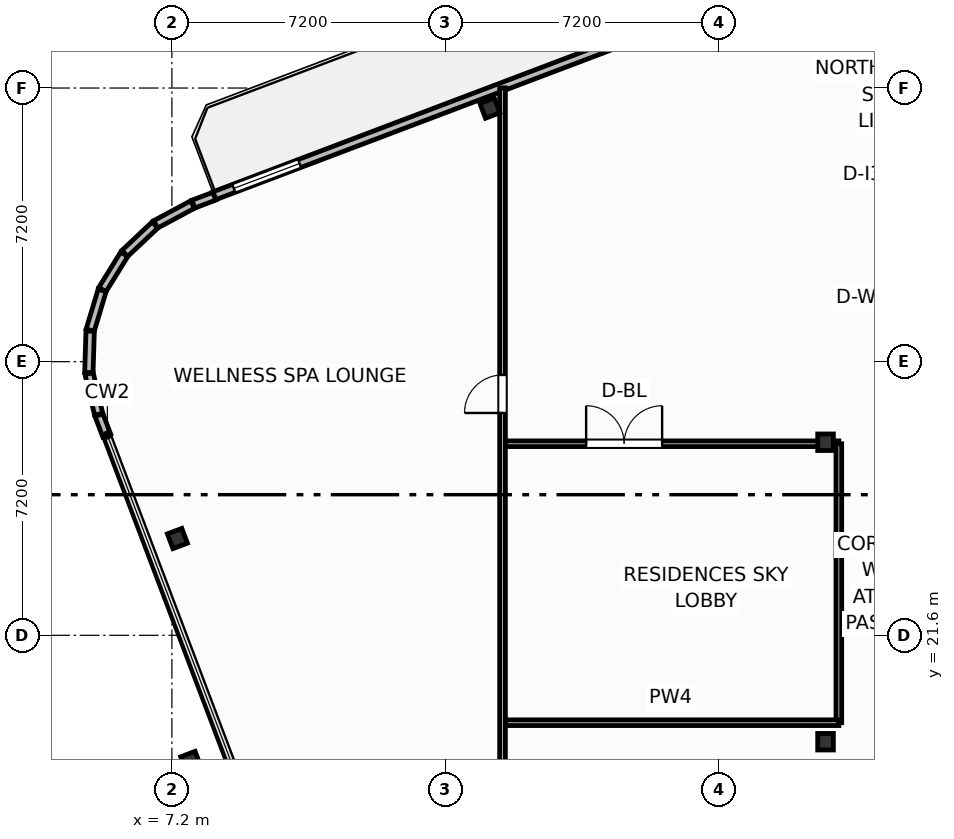
"""IFC4 building model, lengths in metres.
Left out: names, types, materials, properties, quantities, classifications, styles, units other than length and angle.
Written with IfcOpenShell. Run it as: python <this file> out.ifc"""

import sys

from ifc_helpers import new_model, si_unit, direction, frame, frame_2d, origin, origin_2d, place, context, subcontext, project, spatial, rectangle, i_section, extrude, element, fill, save


model = new_model("IFC4")
c1 = context("Model", 3, precision=1e-05, world=origin(), true_north=direction((0.0, 1.0)))
c2 = subcontext(c1, "Body", "Model", "MODEL_VIEW")
j1 = project(units=[si_unit("LENGTHUNIT", "METRE"), si_unit("PLANEANGLEUNIT", "RADIAN")], contexts=[c1])
p1 = place(None, origin())
s1 = spatial("IfcSite", under=j1, at=p1, CompositionType="ELEMENT")
p2 = place(p1, origin())
s2 = spatial("IfcBuilding", under=s1, at=p2, CompositionType="ELEMENT")
p3 = place(p2, frame((0.0, 0.0, 207.9)))
s3 = spatial("IfcBuildingStorey", under=s2, at=p3, CompositionType="ELEMENT", Elevation=207.9)
for number, where, z_axis, x_axis in (
    (1, (24.4, 18.8, 0.0), (0.0, 0.0, 1.0), (1.0, 0.0, 0.0)),
    (2, (24.4, 26.68, 0.0), (0.0, 0.0, 1.0), (1.0, 0.0, 0.0)),
):
    element("IfcColumn", number, at=place(p3, frame(where, z_axis=z_axis, x_axis=x_axis)), inside=s3, PredefinedType="COLUMN", context=c2, shape_type="SweptSolid", body=[
        extrude(i_section(OverallWidth=0.412, OverallDepth=0.435, WebThickness=0.036, FlangeThickness=0.057, FilletRadius=0.025, at=origin_2d()), origin(), (0.0, 0.0, 1.0), 4.8),
    ])
for number, where, z_axis, x_axis in (
    (3, (15.568, 35.472, -0.32), (0.0, 0.0, 1.0), (0.935, 0.354, 0.0)),
    (4, (7.345, 24.146, -0.32), (0.0, 0.0, 1.0), (0.935, 0.354, 0.0)),
    (5, (7.695, 18.281, -0.32), (0.0, 0.0, 1.0), (0.935, 0.354, 0.0)),
):
    element("IfcColumn", number, at=place(p3, frame(where, z_axis=z_axis, x_axis=x_axis)), inside=s3, PredefinedType="COLUMN", context=c2, shape_type="SweptSolid", body=[
        extrude(i_section(OverallWidth=0.406, OverallDepth=0.416, WebThickness=0.03, FlangeThickness=0.048, FilletRadius=0.025, at=origin_2d()), origin(), (0.0, 0.0, 1.0), 5.12),
    ])
p4 = place(p3, frame((8.315, 33.164, 0.0), z_axis=(0.0, 0.0, 1.0), x_axis=(0.935222646765, 0.354060165759, 0.0)))
e6 = element("IfcWall", 6, at=p4, inside=s3, PredefinedType="SOLIDWALL", context=c2, shape_type="SweptSolid", body=[
    extrude(rectangle(XDim=52.2, YDim=0.22, at=frame_2d((26.1, 0.0))), origin(), (0.0, 0.0, 1.0), 3.83),
])
p5 = place(p4, frame((23.64, 0.0, 0.0)))
e7 = element("IfcOpeningElement", 7, at=p5, cuts=e6, PredefinedType="OPENING", context=c2, shape_type="SweptSolid", body=[
    extrude(rectangle(XDim=1.85, YDim=2.3, at=frame_2d((0.925, 1.15))), frame((0.0, 0.12, 0.0), z_axis=(0.0, -1.0, 0.0), x_axis=(1.0, 0.0, 0.0)), (0.0, 0.0, 1.0), 0.24),
])
p6 = place(p4, frame((0.55, 0.0, 0.75)))
e8 = element("IfcOpeningElement", 8, at=p6, cuts=e6, PredefinedType="OPENING", context=c2, shape_type="SweptSolid", body=[
    extrude(rectangle(XDim=1.85, YDim=1.75, at=frame_2d((0.925, 0.875))), frame((0.0, 0.12, 0.0), z_axis=(0.0, -1.0, 0.0), x_axis=(1.0, 0.0, 0.0)), (0.0, 0.0, 1.0), 0.24),
])
p7 = place(p4, frame((49.8, 0.0, 0.75)))
e9 = element("IfcOpeningElement", 9, at=p7, cuts=e6, PredefinedType="OPENING", context=c2, shape_type="SweptSolid", body=[
    extrude(rectangle(XDim=1.85, YDim=1.75, at=frame_2d((0.925, 0.875))), frame((0.0, 0.12, 0.0), z_axis=(0.0, -1.0, 0.0), x_axis=(1.0, 0.0, 0.0)), (0.0, 0.0, 1.0), 0.24),
])
p8 = place(p3, frame((8.319, 33.155, 0.0), z_axis=(0.0, 0.0, 1.0), x_axis=(-0.935359991553, -0.353697167365, 0.0)))
e10 = element("IfcWall", 10, at=p8, inside=s3, PredefinedType="SOLIDWALL", context=c2, shape_type="SweptSolid", body=[
    extrude(rectangle(XDim=0.592, YDim=0.22, at=frame_2d((0.296, 0.0))), origin(), (0.0, 0.0, 1.0), 3.83),
])
p9 = place(p3, frame((7.743, 32.933, 0.0), z_axis=(0.0, 0.0, 1.0), x_axis=(-0.881040688262, -0.473040490473, 0.0)))
e11 = element("IfcWall", 11, at=p9, inside=s3, PredefinedType="SOLIDWALL", context=c2, shape_type="SweptSolid", body=[
    extrude(rectangle(XDim=1.1, YDim=0.22, at=frame_2d((0.55, 0.0))), origin(), (0.0, 0.0, 1.0), 3.83),
])
for number, where, z_axis, x_axis in (
    (12, (6.755, 32.396, 0.0), (0.0, 0.0, 1.0), (-0.729, -0.685, 0.0)),
    (13, (5.947, 31.626, 0.0), (0.0, 0.0, 1.0), (-0.526, -0.85, 0.0)),
    (14, (5.365, 30.674, 0.0), (0.0, 0.0, 1.0), (-0.288, -0.958, 0.0)),
    (15, (5.049, 29.604, 0.0), (0.0, 0.0, 1.0), (-0.031, -1.0, 0.0)),
):
    element("IfcWall", number, at=place(p3, frame(where, z_axis=z_axis, x_axis=x_axis)), inside=s3, PredefinedType="SOLIDWALL", context=c2, shape_type="SweptSolid", body=[
        extrude(rectangle(XDim=1.092, YDim=0.22, at=frame_2d((0.546, 0.0))), origin(), (0.0, 0.0, 1.0), 3.83),
    ])
p10 = place(p3, frame((5.021, 28.488, 0.0), z_axis=(0.0, 0.0, 1.0), x_axis=(0.22882902297, -0.973466629241, 0.0)))
e16 = element("IfcWall", 16, at=p10, inside=s3, PredefinedType="SOLIDWALL", context=c2, shape_type="SweptSolid", body=[
    extrude(rectangle(XDim=1.1, YDim=0.22, at=frame_2d((0.55, 0.0))), origin(), (0.0, 0.0, 1.0), 3.83),
])
p11 = place(p3, frame((5.281, 27.394, 0.0), z_axis=(0.0, 0.0, 1.0), x_axis=(0.354042098677, -0.935229486471, 0.0)))
e17 = element("IfcWall", 17, at=p11, inside=s3, PredefinedType="SOLIDWALL", context=c2, shape_type="SweptSolid", body=[
    extrude(rectangle(XDim=0.577, YDim=0.22, at=frame_2d((0.289, 0.0))), origin(), (0.0, 0.0, 1.0), 3.83),
])
p12 = place(p3, frame((15.9, 26.64, 0.0), z_axis=(0.0, 0.0, 1.0), x_axis=(1.0, 0.0, 0.0)))
e18 = element("IfcWall", 18, at=p12, inside=s3, PredefinedType="PARTITIONING", context=c2, shape_type="SweptSolid", body=[
    extrude(rectangle(XDim=8.85, YDim=0.15, at=frame_2d((4.425, 0.0))), origin(), (0.0, 0.0, 1.0), 3.762),
])
p13 = place(p12, frame((2.2, 0.0, 0.0)))
e19 = element("IfcOpeningElement", 19, at=p13, cuts=e18, PredefinedType="OPENING", context=c2, shape_type="SweptSolid", body=[
    extrude(rectangle(XDim=2.0, YDim=2.05, at=frame_2d((1.0, 1.025))), frame((0.0, 0.085, 0.0), z_axis=(0.0, -1.0, 0.0), x_axis=(1.0, 0.0, 0.0)), (0.0, 0.0, 1.0), 0.17),
])
p14 = place(p3, frame((24.75, 19.3, 0.0), z_axis=(0.0, 0.0, 1.0), x_axis=(0.0, 1.0, 0.0)))
e20 = element("IfcWall", 20, at=p14, inside=s3, PredefinedType="PARTITIONING", context=c2, shape_type="SweptSolid", body=[
    extrude(rectangle(XDim=7.34, YDim=0.15, at=frame_2d((3.67, 0.0))), origin(), (0.0, 0.0, 1.0), 4.55),
])
p15 = place(p3, frame((15.9, 19.3, 0.0), z_axis=(0.0, 0.0, 1.0), x_axis=(1.0, 0.0, 0.0)))
e21 = element("IfcWall", 21, at=p15, inside=s3, PredefinedType="PARTITIONING", context=c2, shape_type="SweptSolid", body=[
    extrude(rectangle(XDim=8.85, YDim=0.15, at=frame_2d((4.425, 0.0))), origin(), (0.0, 0.0, 1.0), 4.55),
])
p16 = place(p3, frame((15.9, 0.25, 0.0), z_axis=(0.0, 0.0, 1.0), x_axis=(0.0, 1.0, 0.0)))
e22 = element("IfcWall", 22, at=p16, inside=s3, PredefinedType="PARTITIONING", context=c2, shape_type="SweptSolid", body=[
    extrude(rectangle(XDim=35.754, YDim=0.15, at=frame_2d((17.877, 0.0))), origin(), (0.0, 0.0, 1.0), 4.55),
])
p17 = place(p16, frame((27.2, 0.0, 0.0)))
e23 = element("IfcOpeningElement", 23, at=p17, cuts=e22, PredefinedType="OPENING", context=c2, shape_type="SweptSolid", body=[
    extrude(rectangle(XDim=1.0, YDim=2.05, at=frame_2d((0.5, 1.025))), frame((0.0, 0.085, 0.0), z_axis=(0.0, -1.0, 0.0), x_axis=(1.0, 0.0, 0.0)), (0.0, 0.0, 1.0), 0.17),
])
p18 = place(p6, origin())
e24 = element("IfcWindow", 24, at=p18, inside=s3, PartitioningType="SINGLE_PANEL", PredefinedType="WINDOW", context=c2, shape_type="SweptSolid", body=[
    extrude(rectangle(XDim=1.85, YDim=1.75, at=frame_2d((0.925, 0.875))), frame((0.0, 0.03, 0.0), z_axis=(0.0, -1.0, 0.0), x_axis=(1.0, 0.0, 0.0)), (0.0, 0.0, 1.0), 0.06),
])
fill(e8, e24)
p19 = place(p13, origin())
e25 = element("IfcDoor", 25, at=p19, inside=s3, OperationType="DOUBLE_DOOR_SINGLE_SWING", PredefinedType="DOOR", context=c2, shape_type="SweptSolid", body=[
    extrude(rectangle(XDim=2.0, YDim=2.05, at=frame_2d((1.0, 1.025))), frame((0.0, 0.025, 0.0), z_axis=(0.0, -1.0, 0.0), x_axis=(1.0, 0.0, 0.0)), (0.0, 0.0, 1.0), 0.05),
])
fill(e19, e25)
p20 = place(p17, origin())
e26 = element("IfcDoor", 26, at=p20, inside=s3, OperationType="SINGLE_SWING_LEFT", PredefinedType="DOOR", context=c2, shape_type="SweptSolid", body=[
    extrude(rectangle(XDim=1.0, YDim=2.05, at=frame_2d((0.5, 1.025))), frame((0.0, 0.025, 0.0), z_axis=(0.0, -1.0, 0.0), x_axis=(1.0, 0.0, 0.0)), (0.0, 0.0, 1.0), 0.05),
])
fill(e23, e26)
save(model, sys.argv[1])
